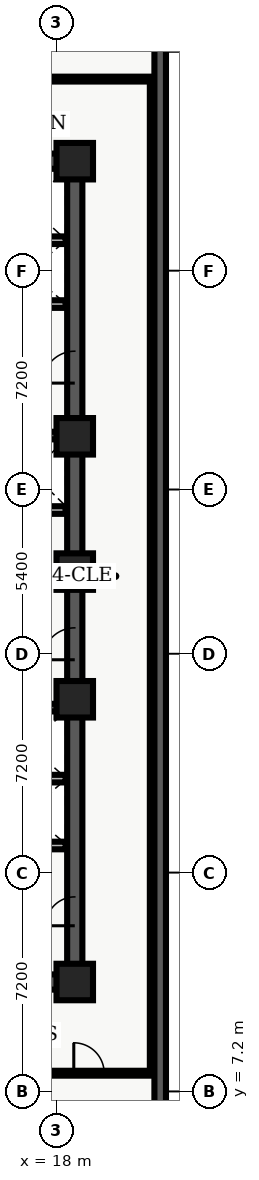
"""IFC4 building model, lengths in metres.
Left out: names, types, materials, properties, quantities, classifications, styles, units other than length and angle.
Written with IfcOpenShell. Run it as: python <this file> out.ifc"""

import sys

from ifc_helpers import new_model, entity, si_unit, converted_unit, direction, frame, origin_with_axes, origin_2d_with_axis, place, context, subcontext, project, spatial, polyline, rectangle, outline, extrude, element, fill, save


model = new_model("IFC4")
c1 = context("Model", 3, precision=1e-05, world=origin_with_axes(), true_north=direction((0.0, 1.0)))
c2 = subcontext(c1, "Body", "Model", "MODEL_VIEW")
j1 = project(units=[si_unit("LENGTHUNIT", "METRE"), converted_unit("PLANEANGLEUNIT", "DEGREE", entity("IfcPlaneAngleMeasure", 0.017), si_unit("PLANEANGLEUNIT", "RADIAN"), dimensions=[0, 0, 0, 0, 0, 0, 0])], contexts=[c1])
p1 = place(None, origin_with_axes())
s1 = spatial("IfcSite", under=j1, at=p1, CompositionType="ELEMENT")
p2 = place(p1, origin_with_axes())
s2 = spatial("IfcBuilding", under=s1, at=p2, CompositionType="ELEMENT")
p3 = place(p2, frame((0.0, 0.0, 100.8), z_axis=(0.0, 0.0, 1.0), x_axis=(1.0, 0.0, 0.0)))
s3 = spatial("IfcBuildingStorey", under=s2, at=p3, CompositionType="ELEMENT", Elevation=100.8)
p4 = place(p3, frame((11.4, 10.8, 0.0), z_axis=(0.0, 0.0, 1.0), x_axis=(1.0, 0.0, 0.0)))
e1 = element("IfcWall", 1, at=p4, inside=s3, PredefinedType="SHEAR", context=c2, shape_type="SweptSolid", body=[
    extrude(outline(polyline([(0.0, -0.25), (7.2, -0.25), (7.2, 0.25), (0.0, 0.25), (0.0, -0.25)])), origin_with_axes(), (0.0, 0.0, 1.0), 3.66),
])
p5 = place(p4, frame((2.625, 0.0, 0.0), z_axis=(0.0, 0.0, 1.0), x_axis=(1.0, 0.0, 0.0)))
e2 = element("IfcOpeningElement", 2, at=p5, cuts=e1, PredefinedType="OPENING", context=c2, shape_type="SweptSolid", body=[
    extrude(rectangle(XDim=1.05, YDim=0.52, at=origin_2d_with_axis()), origin_with_axes(), (0.0, 0.0, 1.0), 2.15),
])
p6 = place(p3, frame((11.4, 37.8, 0.0), z_axis=(0.0, 0.0, 1.0), x_axis=(1.0, 0.0, 0.0)))
e3 = element("IfcWall", 3, at=p6, inside=s3, PredefinedType="SHEAR", context=c2, shape_type="SweptSolid", body=[
    extrude(outline(polyline([(0.0, -0.25), (7.2, -0.25), (7.2, 0.25), (0.0, 0.25), (0.0, -0.25)])), origin_with_axes(), (0.0, 0.0, 1.0), 3.66),
])
p7 = place(p6, frame((2.625, 0.0, 0.0), z_axis=(0.0, 0.0, 1.0), x_axis=(1.0, 0.0, 0.0)))
e4 = element("IfcOpeningElement", 4, at=p7, cuts=e3, PredefinedType="OPENING", context=c2, shape_type="SweptSolid", body=[
    extrude(rectangle(XDim=1.05, YDim=0.52, at=origin_2d_with_axis()), origin_with_axes(), (0.0, 0.0, 1.0), 2.15),
])
p8 = place(p3, frame((18.6, 10.8, 0.0), z_axis=(0.0, 0.0, 1.0), x_axis=(0.0, 1.0, 0.0)))
e5 = element("IfcWall", 5, at=p8, inside=s3, PredefinedType="SHEAR", context=c2, shape_type="SweptSolid", body=[
    extrude(outline(polyline([(0.0, -0.25), (13.5, -0.25), (13.5, 0.25), (0.0, 0.25), (0.0, -0.25)])), origin_with_axes(), (0.0, 0.0, 1.0), 3.66),
])
p9 = place(p8, frame((11.125, 0.0, 0.0), z_axis=(0.0, 0.0, 1.0), x_axis=(1.0, 0.0, 0.0)))
e6 = element("IfcOpeningElement", 6, at=p9, cuts=e5, PredefinedType="OPENING", context=c2, shape_type="SweptSolid", body=[
    extrude(rectangle(XDim=1.05, YDim=0.52, at=origin_2d_with_axis()), origin_with_axes(), (0.0, 0.0, 1.0), 2.15),
])
p10 = place(p8, frame((2.325, 0.0, 0.0), z_axis=(0.0, 0.0, 1.0), x_axis=(1.0, 0.0, 0.0)))
e7 = element("IfcOpeningElement", 7, at=p10, cuts=e5, PredefinedType="OPENING", context=c2, shape_type="SweptSolid", body=[
    extrude(rectangle(XDim=0.95, YDim=0.52, at=origin_2d_with_axis()), origin_with_axes(), (0.0, 0.0, 1.0), 2.15),
])
p11 = place(p3, frame((18.6, 24.3, 0.0), z_axis=(0.0, 0.0, 1.0), x_axis=(0.0, 1.0, 0.0)))
e8 = element("IfcWall", 8, at=p11, inside=s3, PredefinedType="SHEAR", context=c2, shape_type="SweptSolid", body=[
    extrude(outline(polyline([(0.0, -0.25), (13.5, -0.25), (13.5, 0.25), (0.0, 0.25), (0.0, -0.25)])), origin_with_axes(), (0.0, 0.0, 1.0), 3.66),
])
p12 = place(p11, frame((6.725, 0.0, 0.0), z_axis=(0.0, 0.0, 1.0), x_axis=(1.0, 0.0, 0.0)))
e9 = element("IfcOpeningElement", 9, at=p12, cuts=e8, PredefinedType="OPENING", context=c2, shape_type="SweptSolid", body=[
    extrude(rectangle(XDim=1.05, YDim=0.52, at=origin_2d_with_axis()), origin_with_axes(), (0.0, 0.0, 1.0), 2.15),
])
for number, where, z_axis, x_axis in (
    (10, (11.65, 19.825, 0.0), (0.0, 0.0, 1.0), (1.0, 0.0, 0.0)),
    (11, (11.65, 28.775, 0.0), (0.0, 0.0, 1.0), (1.0, 0.0, 0.0)),
):
    element("IfcWall", number, at=place(p3, frame(where, z_axis=z_axis, x_axis=x_axis)), inside=s3, PredefinedType="SHEAR", context=c2, shape_type="SweptSolid", body=[
        extrude(outline(polyline([(0.0, -0.125), (6.7, -0.125), (6.7, 0.125), (0.0, 0.125), (0.0, -0.125)])), origin_with_axes(), (0.0, 0.0, 1.0), 3.66),
    ])
p13 = place(p3, frame((11.7, 24.1, 0.0), z_axis=(0.0, 0.0, 1.0), x_axis=(1.0, 0.0, 0.0)))
e12 = element("IfcWall", 12, at=p13, inside=s3, PredefinedType="SOLIDWALL", context=c2, shape_type="SweptSolid", body=[
    extrude(outline(polyline([(0.0, -0.125), (6.6, -0.125), (6.6, 0.125), (0.0, 0.125), (0.0, -0.125)])), origin_with_axes(), (0.0, 0.0, 1.0), 2.7),
])
p14 = place(p13, frame((3.75, 0.0, 0.0), z_axis=(0.0, 0.0, 1.0), x_axis=(1.0, 0.0, 0.0)))
e13 = element("IfcOpeningElement", 13, at=p14, cuts=e12, PredefinedType="OPENING", context=c2, shape_type="SweptSolid", body=[
    extrude(rectangle(XDim=0.9, YDim=0.27, at=origin_2d_with_axis()), origin_with_axes(), (0.0, 0.0, 1.0), 2.15),
])
p15 = place(p3, frame((11.7, 26.325, 0.0), z_axis=(0.0, 0.0, 1.0), x_axis=(1.0, 0.0, 0.0)))
e14 = element("IfcWall", 14, at=p15, inside=s3, PredefinedType="SOLIDWALL", context=c2, shape_type="SweptSolid", body=[
    extrude(outline(polyline([(0.0, -0.125), (6.6, -0.125), (6.6, 0.125), (0.0, 0.125), (0.0, -0.125)])), origin_with_axes(), (0.0, 0.0, 1.0), 2.7),
])
p16 = place(p15, frame((3.5, 0.0, 0.0), z_axis=(0.0, 0.0, 1.0), x_axis=(1.0, 0.0, 0.0)))
e15 = element("IfcOpeningElement", 15, at=p16, cuts=e14, PredefinedType="OPENING", context=c2, shape_type="SweptSolid", body=[
    extrude(rectangle(XDim=0.9, YDim=0.27, at=origin_2d_with_axis()), origin_with_axes(), (0.0, 0.0, 1.0), 2.15),
])
for number, where, z_axis, x_axis in (
    (16, (18.6, 10.8, 0.0), (0.0, 0.0, 1.0), (1.0, 0.0, 0.0)),
    (17, (18.6, 20.1, 0.0), (0.0, 0.0, 1.0), (1.0, 0.0, 0.0)),
    (18, (18.6, 24.3, 0.0), (0.0, 0.0, 1.0), (1.0, 0.0, 0.0)),
    (19, (18.6, 28.75, 0.0), (0.0, 0.0, 1.0), (1.0, 0.0, 0.0)),
    (20, (18.6, 37.8, 0.0), (0.0, 0.0, 1.0), (1.0, 0.0, 0.0)),
):
    element("IfcColumn", number, at=place(p3, frame(where, z_axis=z_axis, x_axis=x_axis)), inside=s3, PredefinedType="COLUMN", context=c2, shape_type="SweptSolid", body=[
        extrude(rectangle(XDim=1.2, YDim=1.2, at=origin_2d_with_axis()), origin_with_axes(), (0.0, 0.0, 1.0), 3.9),
    ])
for number, where, z_axis, x_axis in (
    (21, (15.84, 15.29, 0.0), (0.0, 0.0, 1.0), (1.0, 0.0, 0.0)),
    (22, (15.84, 17.49, 0.0), (0.0, 0.0, 1.0), (1.0, 0.0, 0.0)),
    (23, (15.84, 33.1, 0.0), (0.0, 0.0, 1.0), (1.0, 0.0, 0.0)),
    (24, (15.84, 35.2, 0.0), (0.0, 0.0, 1.0), (1.0, 0.0, 0.0)),
):
    element("IfcWall", number, at=place(p3, frame(where, z_axis=z_axis, x_axis=x_axis)), inside=s3, PredefinedType="SOLIDWALL", context=c2, shape_type="SweptSolid", body=[
        extrude(outline(polyline([(0.0, -0.125), (2.46, -0.125), (2.46, 0.125), (0.0, 0.125), (0.0, -0.125)])), origin_with_axes(), (0.0, 0.0, 1.0), 2.7),
    ])
p17 = place(p3, frame((2.6, 7.8, 0.0), z_axis=(0.0, 0.0, 1.0), x_axis=(1.0, 0.0, 0.0)))
e25 = element("IfcWall", 25, at=p17, inside=s3, PredefinedType="PARTITIONING", context=c2, shape_type="SweptSolid", body=[
    extrude(outline(polyline([(0.0, -0.08), (18.625, -0.08), (18.625, 0.08), (0.0, 0.08), (0.0, -0.08)])), origin_with_axes(), (0.0, 0.0, 1.0), 2.7),
])
p18 = place(p17, frame((2.42, 0.0, 0.0), z_axis=(0.0, 0.0, 1.0), x_axis=(1.0, 0.0, 0.0)))
e26 = element("IfcOpeningElement", 26, at=p18, cuts=e25, PredefinedType="OPENING", context=c2, shape_type="SweptSolid", body=[
    extrude(rectangle(XDim=1.0, YDim=0.18, at=origin_2d_with_axis()), origin_with_axes(), (0.0, 0.0, 1.0), 2.15),
])
p19 = place(p17, frame((10.523, 0.0, 0.0), z_axis=(0.0, 0.0, 1.0), x_axis=(1.0, 0.0, 0.0)))
e27 = element("IfcOpeningElement", 27, at=p19, cuts=e25, PredefinedType="OPENING", context=c2, shape_type="SweptSolid", body=[
    extrude(rectangle(XDim=1.2, YDim=0.18, at=origin_2d_with_axis()), origin_with_axes(), (0.0, 0.0, 1.0), 2.2),
])
p20 = place(p17, frame((16.468, 0.0, 0.0), z_axis=(0.0, 0.0, 1.0), x_axis=(1.0, 0.0, 0.0)))
e28 = element("IfcOpeningElement", 28, at=p20, cuts=e25, PredefinedType="OPENING", context=c2, shape_type="SweptSolid", body=[
    extrude(rectangle(XDim=1.0, YDim=0.18, at=origin_2d_with_axis()), origin_with_axes(), (0.0, 0.0, 1.0), 2.15),
])
p21 = place(p3, frame((2.6, 40.5, 0.0), z_axis=(0.0, 0.0, 1.0), x_axis=(1.0, 0.0, 0.0)))
e29 = element("IfcWall", 29, at=p21, inside=s3, PredefinedType="PARTITIONING", context=c2, shape_type="SweptSolid", body=[
    extrude(outline(polyline([(0.0, -0.08), (18.65, -0.08), (18.65, 0.08), (0.0, 0.08), (0.0, -0.08)])), origin_with_axes(), (0.0, 0.0, 1.0), 2.7),
])
p22 = place(p21, frame((5.275, 0.0, 0.0), z_axis=(0.0, 0.0, 1.0), x_axis=(1.0, 0.0, 0.0)))
e30 = element("IfcOpeningElement", 30, at=p22, cuts=e29, PredefinedType="OPENING", context=c2, shape_type="SweptSolid", body=[
    extrude(rectangle(XDim=1.0, YDim=0.18, at=origin_2d_with_axis()), origin_with_axes(), (0.0, 0.0, 1.0), 2.15),
])
p23 = place(p21, frame((12.61, 0.0, 0.0), z_axis=(0.0, 0.0, 1.0), x_axis=(1.0, 0.0, 0.0)))
e31 = element("IfcOpeningElement", 31, at=p23, cuts=e29, PredefinedType="OPENING", context=c2, shape_type="SweptSolid", body=[
    extrude(rectangle(XDim=1.2, YDim=0.18, at=origin_2d_with_axis()), origin_with_axes(), (0.0, 0.0, 1.0), 2.2),
])
p24 = place(p3, frame((21.15, 7.8, 0.0), z_axis=(0.0, 0.0, 1.0), x_axis=(0.0, 1.0, 0.0)))
e32 = element("IfcWall", 32, at=p24, inside=s3, PredefinedType="PARTITIONING", context=c2, shape_type="SweptSolid", body=[
    extrude(outline(polyline([(0.0, -0.08), (32.7, -0.08), (32.7, 0.08), (0.0, 0.08), (0.0, -0.08)])), origin_with_axes(), (0.0, 0.0, 1.0), 2.7),
])
p25 = place(p3, frame((21.41, 45.82, 0.0), z_axis=(0.0, 0.0, 1.0), x_axis=(0.0, -1.0, 0.0)))
e33 = element("IfcWall", 33, at=p25, inside=s3, PredefinedType="SOLIDWALL", context=c2, shape_type="SweptSolid", body=[
    extrude(outline(polyline([(0.0, -0.19), (45.82, -0.19), (45.82, 0.19), (0.0, 0.19), (0.0, -0.19)])), origin_with_axes(), (0.0, 0.0, 1.0), 3.66),
])
p26 = place(p25, frame((3.079, 0.0, 0.45), z_axis=(0.0, 0.0, 1.0), x_axis=(1.0, 0.0, 0.0)))
e34 = element("IfcOpeningElement", 34, at=p26, cuts=e33, PredefinedType="OPENING", context=c2, shape_type="SweptSolid", body=[
    extrude(rectangle(XDim=2.1, YDim=0.4, at=origin_2d_with_axis()), origin_with_axes(), (0.0, 0.0, 1.0), 2.2),
])
p27 = place(p25, frame((42.741, 0.0, 0.45), z_axis=(0.0, 0.0, 1.0), x_axis=(1.0, 0.0, 0.0)))
e35 = element("IfcOpeningElement", 35, at=p27, cuts=e33, PredefinedType="OPENING", context=c2, shape_type="SweptSolid", body=[
    extrude(rectangle(XDim=2.1, YDim=0.4, at=origin_2d_with_axis()), origin_with_axes(), (0.0, 0.0, 1.0), 2.2),
])
p28 = place(p8, frame((11.125, 0.0, 0.0), z_axis=(0.0, 0.0, 1.0), x_axis=(1.0, 0.0, 0.0)))
e36 = element("IfcDoor", 36, at=p28, inside=s3, OperationType="SINGLE_SWING_LEFT", PredefinedType="DOOR", context=c2, shape_type="SweptSolid", body=[
    extrude(rectangle(XDim=1.05, YDim=0.09, at=origin_2d_with_axis()), origin_with_axes(), (0.0, 0.0, 1.0), 2.15),
])
fill(e6, e36)
p29 = place(p8, frame((2.325, 0.0, 0.0), z_axis=(0.0, 0.0, 1.0), x_axis=(1.0, 0.0, 0.0)))
e37 = element("IfcDoor", 37, at=p29, inside=s3, OperationType="SINGLE_SWING_LEFT", PredefinedType="DOOR", context=c2, shape_type="SweptSolid", body=[
    extrude(rectangle(XDim=0.95, YDim=0.09, at=origin_2d_with_axis()), origin_with_axes(), (0.0, 0.0, 1.0), 2.15),
])
fill(e7, e37)
p30 = place(p11, frame((6.725, 0.0, 0.0), z_axis=(0.0, 0.0, 1.0), x_axis=(1.0, 0.0, 0.0)))
e38 = element("IfcDoor", 38, at=p30, inside=s3, OperationType="SINGLE_SWING_LEFT", PredefinedType="DOOR", context=c2, shape_type="SweptSolid", body=[
    extrude(rectangle(XDim=1.05, YDim=0.09, at=origin_2d_with_axis()), origin_with_axes(), (0.0, 0.0, 1.0), 2.15),
])
fill(e9, e38)
p31 = place(p17, frame((16.468, 0.0, 0.0), z_axis=(0.0, 0.0, 1.0), x_axis=(1.0, 0.0, 0.0)))
e39 = element("IfcDoor", 39, at=p31, inside=s3, OperationType="SINGLE_SWING_LEFT", PredefinedType="DOOR", context=c2, shape_type="SweptSolid", body=[
    extrude(rectangle(XDim=1.0, YDim=0.09, at=origin_2d_with_axis()), origin_with_axes(), (0.0, 0.0, 1.0), 2.15),
])
fill(e28, e39)
save(model, sys.argv[1])
